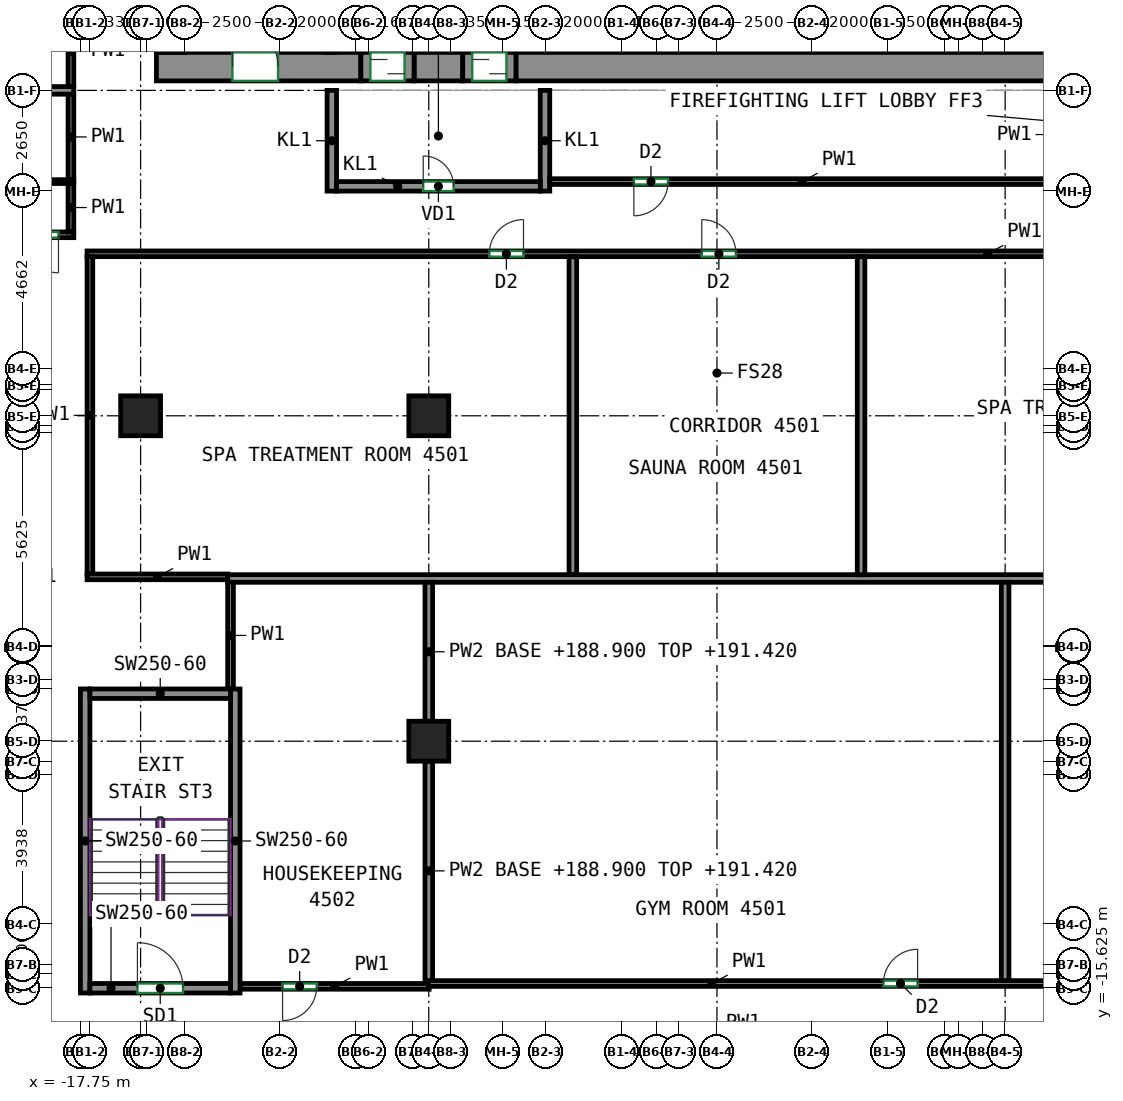
"""IFC4 building model, lengths in metres.
Left out: names, types, materials, properties, quantities, classifications, styles, units other than length and angle.
Written with IfcOpenShell. Run it as: python <this file> out.ifc"""

import sys

from ifc_helpers import new_model, si_unit, direction, frame, frame_2d, origin, origin_2d, place, context, subcontext, project, spatial, rectangle, extrude, source, transform, mapped, element, fill, save


model = new_model("IFC4")
c1 = context("Model", 3, precision=1e-05, world=origin(), true_north=direction((0.0, 1.0)))
c2 = subcontext(c1, "Body", "Model", "MODEL_VIEW")
j1 = project(units=[si_unit("LENGTHUNIT", "METRE"), si_unit("PLANEANGLEUNIT", "RADIAN")], contexts=[c1])
p1 = place(None, origin())
s1 = spatial("IfcSite", under=j1, at=p1, CompositionType="ELEMENT")
p2 = place(p1, origin())
s2 = spatial("IfcBuilding", under=s1, at=p2, CompositionType="ELEMENT")
p3 = place(p2, frame((0.0, 0.0, 188.9)))
s3 = spatial("IfcBuildingStorey", under=s2, at=p3, CompositionType="ELEMENT", Elevation=188.9)
m1 = source(origin(), c2, "Body", "SweptSolid", [
    extrude(rectangle(XDim=1.05, YDim=1.05, at=origin_2d()), origin(), (0.0, 0.0, 1.0), 3.12),
])
for number, where, z_axis, x_axis in (
    (1, (-16.167, -0.562, 0.0), (0.0, 0.0, 1.0), (1.0, 0.0, 0.0)),
    (2, (-8.583, -9.125, 0.0), (0.0, 0.0, 1.0), (1.0, 0.0, 0.0)),
    (3, (-8.583, -0.562, 0.0), (0.0, 0.0, 1.0), (1.0, 0.0, 0.0)),
):
    element("IfcColumn", number, at=place(p3, frame(where, z_axis=z_axis, x_axis=x_axis)), inside=s3, PredefinedType="COLUMN", context=c2, shape_type="MappedRepresentation", body=[
        mapped(m1, transform((0.0, 0.0, 0.0))),
    ])
m2 = source(origin(), c2, "Body", "SweptSolid", [
    extrude(rectangle(XDim=5.38, YDim=0.75, at=frame_2d((2.69, 0.0))), origin(), (0.0, 0.0, 1.0), 3.12),
])
p4 = place(p3, frame((-15.75, 8.625, 0.0), z_axis=(0.0, 0.0, 1.0), x_axis=(1.0, 0.0, 0.0)))
e4 = element("IfcWall", 4, at=p4, inside=s3, PredefinedType="SHEAR", context=c2, shape_type="MappedRepresentation", body=[
    mapped(m2, transform((0.0, 0.0, 0.0))),
])
p5 = place(p4, frame((2.0, 0.0, 0.0)))
e5 = element("IfcOpeningElement", 5, at=p5, cuts=e4, PredefinedType="OPENING", context=c2, shape_type="SweptSolid", body=[
    extrude(rectangle(XDim=1.2, YDim=2.1, at=frame_2d((0.6, 1.05))), frame((0.0, 0.385, 0.0), z_axis=(0.0, -1.0, 0.0), x_axis=(1.0, 0.0, 0.0)), (0.0, 0.0, 1.0), 0.77),
])
m3 = source(origin(), c2, "Body", "SweptSolid", [
    extrude(rectangle(XDim=1.28, YDim=0.75, at=frame_2d((0.64, 0.0))), origin(), (0.0, 0.0, 1.0), 3.12),
])
p6 = place(p3, frame((-8.97, 8.625, 0.0), z_axis=(0.0, 0.0, 1.0), x_axis=(1.0, 0.0, 0.0)))
e6 = element("IfcWall", 6, at=p6, inside=s3, PredefinedType="SHEAR", context=c2, shape_type="MappedRepresentation", body=[
    mapped(m3, transform((0.0, 0.0, 0.0))),
])
m4 = source(origin(), c2, "Body", "SweptSolid", [
    extrude(rectangle(XDim=14.18, YDim=0.75, at=frame_2d((7.09, 0.0))), origin(), (0.0, 0.0, 1.0), 3.12),
])
p7 = place(p3, frame((-6.29, 8.625, 0.0), z_axis=(0.0, 0.0, 1.0), x_axis=(1.0, 0.0, 0.0)))
e7 = element("IfcWall", 7, at=p7, inside=s3, PredefinedType="SHEAR", context=c2, shape_type="MappedRepresentation", body=[
    mapped(m4, transform((0.0, 0.0, 0.0))),
])
m5 = source(origin(), c2, "Body", "SweptSolid", [
    extrude(rectangle(XDim=8.0, YDim=0.25, at=frame_2d((4.0, 0.0))), origin(), (0.0, 0.0, 1.0), 3.12),
])
for number, where, z_axis, x_axis in (
    (8, (-17.625, -15.75, 0.0), (0.0, 0.0, 1.0), (0.0, 1.0, 0.0)),
    (9, (-13.675, -15.75, 0.0), (0.0, 0.0, 1.0), (0.0, 1.0, 0.0)),
):
    element("IfcWall", number, at=place(p3, frame(where, z_axis=z_axis, x_axis=x_axis)), inside=s3, PredefinedType="SHEAR", context=c2, shape_type="MappedRepresentation", body=[
        mapped(m5, transform((0.0, 0.0, 0.0))),
    ])
m6 = source(origin(), c2, "Body", "SweptSolid", [
    extrude(rectangle(XDim=3.7, YDim=0.25, at=frame_2d((1.85, 0.0))), origin(), (0.0, 0.0, 1.0), 3.12),
])
p8 = place(p3, frame((-17.5, -15.625, 0.0), z_axis=(0.0, 0.0, 1.0), x_axis=(1.0, 0.0, 0.0)))
e10 = element("IfcWall", 10, at=p8, inside=s3, PredefinedType="SHEAR", context=c2, shape_type="MappedRepresentation", body=[
    mapped(m6, transform((0.0, 0.0, 0.0))),
])
p9 = place(p8, frame((1.25, 0.0, 0.0)))
e11 = element("IfcOpeningElement", 11, at=p9, cuts=e10, PredefinedType="OPENING", context=c2, shape_type="SweptSolid", body=[
    extrude(rectangle(XDim=1.2, YDim=2.1, at=frame_2d((0.6, 1.05))), frame((0.0, 0.135, 0.0), z_axis=(0.0, -1.0, 0.0), x_axis=(1.0, 0.0, 0.0)), (0.0, 0.0, 1.0), 0.27),
])
p10 = place(p3, frame((-17.5, -7.875, 0.0), z_axis=(0.0, 0.0, 1.0), x_axis=(1.0, 0.0, 0.0)))
e12 = element("IfcWall", 12, at=p10, inside=s3, PredefinedType="SHEAR", context=c2, shape_type="MappedRepresentation", body=[
    mapped(m6, transform((0.0, 0.0, 0.0))),
])
m7 = source(origin(), c2, "Body", "SweptSolid", [
    extrude(rectangle(XDim=2.65, YDim=0.25, at=frame_2d((1.325, 0.0))), origin(), (0.0, 0.0, 1.0), 3.12),
])
for number, where, z_axis, x_axis in (
    (13, (-11.135, 5.35, 0.0), (0.0, 0.0, 1.0), (0.0, 1.0, 0.0)),
    (14, (-5.525, 5.35, 0.0), (0.0, 0.0, 1.0), (0.0, 1.0, 0.0)),
):
    element("IfcWall", number, at=place(p3, frame(where, z_axis=z_axis, x_axis=x_axis)), inside=s3, PredefinedType="PARTITIONING", context=c2, shape_type="MappedRepresentation", body=[
        mapped(m7, transform((0.0, 0.0, 0.0))),
    ])
m8 = source(origin(), c2, "Body", "SweptSolid", [
    extrude(rectangle(XDim=5.36, YDim=0.25, at=frame_2d((2.68, 0.0))), origin(), (0.0, 0.0, 1.0), 3.12),
])
p11 = place(p3, frame((-11.01, 5.475, 0.0), z_axis=(0.0, 0.0, 1.0), x_axis=(1.0, 0.0, 0.0)))
e15 = element("IfcWall", 15, at=p11, inside=s3, PredefinedType="PARTITIONING", context=c2, shape_type="MappedRepresentation", body=[
    mapped(m8, transform((0.0, 0.0, 0.0))),
])
p12 = place(p11, frame((2.28, 0.0, 0.0)))
e16 = element("IfcOpeningElement", 16, at=p12, cuts=e15, PredefinedType="OPENING", context=c2, shape_type="SweptSolid", body=[
    extrude(rectangle(XDim=0.8, YDim=2.0, at=frame_2d((0.4, 1.0))), frame((0.0, 0.135, 0.0), z_axis=(0.0, -1.0, 0.0), x_axis=(1.0, 0.0, 0.0)), (0.0, 0.0, 1.0), 0.27),
])
m9 = source(origin(), c2, "Body", "SweptSolid", [
    extrude(rectangle(XDim=1.4, YDim=0.75, at=frame_2d((0.7, 0.0))), origin(), (0.0, 0.0, 1.0), 2.7),
])
p13 = place(p3, frame((-10.37, 8.625, 0.0), z_axis=(0.0, 0.0, 1.0), x_axis=(1.0, 0.0, 0.0)))
e17 = element("IfcWall", 17, at=p13, inside=s3, PredefinedType="PARTITIONING", context=c2, shape_type="MappedRepresentation", body=[
    mapped(m9, transform((0.0, 0.0, 0.0))),
])
p14 = place(p13, frame((0.25, 0.0, 0.0)))
e18 = element("IfcOpeningElement", 18, at=p14, cuts=e17, PredefinedType="OPENING", context=c2, shape_type="SweptSolid", body=[
    extrude(rectangle(XDim=0.9, YDim=2.1, at=frame_2d((0.45, 1.05))), frame((0.0, 0.385, 0.0), z_axis=(0.0, -1.0, 0.0), x_axis=(1.0, 0.0, 0.0)), (0.0, 0.0, 1.0), 0.77),
])
m10 = source(origin(), c2, "Body", "SweptSolid", [
    extrude(rectangle(XDim=1.4, YDim=0.75, at=frame_2d((0.7, 0.0))), origin(), (0.0, 0.0, 1.0), 2.7),
])
p15 = place(p3, frame((-7.69, 8.625, 0.0), z_axis=(0.0, 0.0, 1.0), x_axis=(1.0, 0.0, 0.0)))
e19 = element("IfcWall", 19, at=p15, inside=s3, PredefinedType="PARTITIONING", context=c2, shape_type="MappedRepresentation", body=[
    mapped(m10, transform((0.0, 0.0, 0.0))),
])
p16 = place(p15, frame((0.25, 0.0, 0.0)))
e20 = element("IfcOpeningElement", 20, at=p16, cuts=e19, PredefinedType="OPENING", context=c2, shape_type="SweptSolid", body=[
    extrude(rectangle(XDim=0.9, YDim=2.1, at=frame_2d((0.45, 1.05))), frame((0.0, 0.385, 0.0), z_axis=(0.0, -1.0, 0.0), x_axis=(1.0, 0.0, 0.0)), (0.0, 0.0, 1.0), 0.77),
])
p17 = place(p3, frame((-17.925, 4.2, 0.0), z_axis=(0.0, 0.0, 1.0), x_axis=(-1.0, 0.0, 0.0)))
e21 = element("IfcWall", 21, at=p17, inside=s3, PredefinedType="PARTITIONING", context=c2, shape_type="SweptSolid", body=[
    extrude(rectangle(XDim=2.109, YDim=0.15, at=frame_2d((1.054, 0.0))), origin(), (0.0, 0.0, 1.0), 3.12),
])
p18 = place(p17, frame((0.403, 0.0, 0.0)))
e22 = element("IfcOpeningElement", 22, at=p18, cuts=e21, PredefinedType="OPENING", context=c2, shape_type="SweptSolid", body=[
    extrude(rectangle(XDim=1.0, YDim=2.1, at=frame_2d((0.5, 1.05))), frame((0.0, 0.085, 0.0), z_axis=(0.0, -1.0, 0.0), x_axis=(1.0, 0.0, 0.0)), (0.0, 0.0, 1.0), 0.17),
])
p19 = place(p3, frame((-18.0, 4.275, 0.0), z_axis=(0.0, 0.0, 1.0), x_axis=(0.0, 1.0, 0.0)))
e23 = element("IfcWall", 23, at=p19, inside=s3, PredefinedType="PARTITIONING", context=c2, shape_type="SweptSolid", body=[
    extrude(rectangle(XDim=1.285, YDim=0.15, at=frame_2d((0.643, 0.0))), origin(), (0.0, 0.0, 1.0), 3.12),
])
p20 = place(p3, frame((-18.0, 5.64, 0.0), z_axis=(0.0, 0.0, 1.0), x_axis=(0.0, 1.0, 0.0)))
e24 = element("IfcWall", 24, at=p20, inside=s3, PredefinedType="PARTITIONING", context=c2, shape_type="SweptSolid", body=[
    extrude(rectangle(XDim=2.27, YDim=0.15, at=frame_2d((1.135, 0.0))), origin(), (0.0, 0.0, 1.0), 3.12),
])
p21 = place(p3, frame((-18.0, 8.09, 0.0), z_axis=(0.0, 0.0, 1.0), x_axis=(0.0, 1.0, 0.0)))
e25 = element("IfcWall", 25, at=p21, inside=s3, PredefinedType="PARTITIONING", context=c2, shape_type="SweptSolid", body=[
    extrude(rectangle(XDim=1.87, YDim=0.15, at=frame_2d((0.935, 0.0))), origin(), (0.0, 0.0, 1.0), 3.12),
])
p22 = place(p3, frame((7.875, 5.6, 0.0), z_axis=(0.0, 0.0, 1.0), x_axis=(-1.0, 0.0, 0.0)))
e26 = element("IfcWall", 26, at=p22, inside=s3, PredefinedType="PARTITIONING", context=c2, shape_type="SweptSolid", body=[
    extrude(rectangle(XDim=13.275, YDim=0.15, at=frame_2d((6.637, 0.0))), origin(), (0.0, 0.0, 1.0), 3.12),
])
p23 = place(p22, frame((10.162, 0.0, 0.0)))
e27 = element("IfcOpeningElement", 27, at=p23, cuts=e26, PredefinedType="OPENING", context=c2, shape_type="SweptSolid", body=[
    extrude(rectangle(XDim=0.9, YDim=2.1, at=frame_2d((0.45, 1.05))), frame((0.0, 0.085, 0.0), z_axis=(0.0, -1.0, 0.0), x_axis=(1.0, 0.0, 0.0)), (0.0, 0.0, 1.0), 0.17),
])
p24 = place(p3, frame((-17.575, 3.7, 0.0), z_axis=(0.0, 0.0, 1.0), x_axis=(1.0, 0.0, 0.0)))
e28 = element("IfcWall", 28, at=p24, inside=s3, PredefinedType="PARTITIONING", context=c2, shape_type="SweptSolid", body=[
    extrude(rectangle(XDim=33.85, YDim=0.15, at=frame_2d((16.925, 0.0))), origin(), (0.0, 0.0, 1.0), 3.12),
])
p25 = place(p24, frame((10.584, 0.0, 0.0)))
e29 = element("IfcOpeningElement", 29, at=p25, cuts=e28, PredefinedType="OPENING", context=c2, shape_type="SweptSolid", body=[
    extrude(rectangle(XDim=0.9, YDim=2.1, at=frame_2d((0.45, 1.05))), frame((0.0, 0.085, 0.0), z_axis=(0.0, -1.0, 0.0), x_axis=(1.0, 0.0, 0.0)), (0.0, 0.0, 1.0), 0.17),
])
p26 = place(p24, frame((16.175, 0.0, 0.0)))
e30 = element("IfcOpeningElement", 30, at=p26, cuts=e28, PredefinedType="OPENING", context=c2, shape_type="SweptSolid", body=[
    extrude(rectangle(XDim=0.9, YDim=2.1, at=frame_2d((0.45, 1.05))), frame((0.0, 0.085, 0.0), z_axis=(0.0, -1.0, 0.0), x_axis=(1.0, 0.0, 0.0)), (0.0, 0.0, 1.0), 0.17),
])
p27 = place(p24, frame((25.696, 0.0, 0.0)))
e31 = element("IfcOpeningElement", 31, at=p27, cuts=e28, PredefinedType="OPENING", context=c2, shape_type="SweptSolid", body=[
    extrude(rectangle(XDim=0.9, YDim=2.1, at=frame_2d((0.45, 1.05))), frame((0.0, 0.085, 0.0), z_axis=(0.0, -1.0, 0.0), x_axis=(1.0, 0.0, 0.0)), (0.0, 0.0, 1.0), 0.17),
])
p28 = place(p3, frame((-17.5, -4.725, 0.0), z_axis=(0.0, 0.0, 1.0), x_axis=(0.0, 1.0, 0.0)))
e32 = element("IfcWall", 32, at=p28, inside=s3, PredefinedType="PARTITIONING", context=c2, shape_type="SweptSolid", body=[
    extrude(rectangle(XDim=8.35, YDim=0.15, at=frame_2d((4.175, 0.0))), origin(), (0.0, 0.0, 1.0), 3.12),
])
p29 = place(p3, frame((-17.575, -4.8, 0.0), z_axis=(0.0, 0.0, 1.0), x_axis=(1.0, 0.0, 0.0)))
e33 = element("IfcWall", 33, at=p29, inside=s3, PredefinedType="PARTITIONING", context=c2, shape_type="SweptSolid", body=[
    extrude(rectangle(XDim=3.702, YDim=0.15, at=frame_2d((1.851, 0.0))), origin(), (0.0, 0.0, 1.0), 3.12),
])
p30 = place(p3, frame((-13.8, -7.75, 0.0), z_axis=(0.0, 0.0, 1.0), x_axis=(0.0, 1.0, 0.0)))
e34 = element("IfcWall", 34, at=p30, inside=s3, PredefinedType="PARTITIONING", context=c2, shape_type="SweptSolid", body=[
    extrude(rectangle(XDim=2.817, YDim=0.15, at=frame_2d((1.408, 0.0))), origin(), (0.0, 0.0, 1.0), 3.12),
])
p31 = place(p3, frame((-8.573, -15.575, 0.0), z_axis=(0.0, 0.0, 1.0), x_axis=(-1.0, 0.0, 0.0)))
e35 = element("IfcWall", 35, at=p31, inside=s3, PredefinedType="PARTITIONING", context=c2, shape_type="SweptSolid", body=[
    extrude(rectangle(XDim=4.977, YDim=0.15, at=frame_2d((2.489, 0.0))), origin(), (0.0, 0.0, 1.0), 3.12),
])
p32 = place(p31, frame((2.958, 0.0, 0.0)))
e36 = element("IfcOpeningElement", 36, at=p32, cuts=e35, PredefinedType="OPENING", context=c2, shape_type="SweptSolid", body=[
    extrude(rectangle(XDim=0.9, YDim=2.1, at=frame_2d((0.45, 1.05))), frame((0.0, 0.085, 0.0), z_axis=(0.0, -1.0, 0.0), x_axis=(1.0, 0.0, 0.0)), (0.0, 0.0, 1.0), 0.17),
])
p33 = place(p3, frame((-8.593, -15.5, 0.0), z_axis=(0.0, 0.0, 1.0), x_axis=(1.0, 0.0, 0.0)))
e37 = element("IfcWall", 37, at=p33, inside=s3, PredefinedType="PARTITIONING", context=c2, shape_type="SweptSolid", body=[
    extrude(rectangle(XDim=24.868, YDim=0.15, at=frame_2d((12.434, 0.0))), origin(), (0.0, 0.0, 1.0), 3.12),
])
p34 = place(p33, frame((11.973, 0.0, 0.0)))
e38 = element("IfcOpeningElement", 38, at=p34, cuts=e37, PredefinedType="OPENING", context=c2, shape_type="SweptSolid", body=[
    extrude(rectangle(XDim=0.9, YDim=2.1, at=frame_2d((0.45, 1.05))), frame((0.0, 0.085, 0.0), z_axis=(0.0, -1.0, 0.0), x_axis=(1.0, 0.0, 0.0)), (0.0, 0.0, 1.0), 0.17),
])
p35 = place(p3, frame((-17.927, 5.6, 0.0), z_axis=(0.0, 0.0, 1.0), x_axis=(-1.0, 0.0, 0.0)))
e39 = element("IfcWall", 39, at=p35, inside=s3, PredefinedType="PARTITIONING", context=c2, shape_type="SweptSolid", body=[
    extrude(rectangle(XDim=3.325, YDim=0.1, at=frame_2d((1.663, 0.0))), origin(), (0.0, 0.0, 1.0), 3.12),
])
p36 = place(p35, frame((2.225, 0.0, 0.0)))
e40 = element("IfcOpeningElement", 40, at=p36, cuts=e39, PredefinedType="OPENING", context=c2, shape_type="SweptSolid", body=[
    extrude(rectangle(XDim=0.9, YDim=2.1, at=frame_2d((0.45, 1.05))), frame((0.0, 0.06, 0.0), z_axis=(0.0, -1.0, 0.0), x_axis=(1.0, 0.0, 0.0)), (0.0, 0.0, 1.0), 0.12),
])
p37 = place(p3, frame((-26.4, 8.0, 0.0), z_axis=(0.0, 0.0, 1.0), x_axis=(1.0, 0.0, 0.0)))
e41 = element("IfcWall", 41, at=p37, inside=s3, PredefinedType="PARTITIONING", context=c2, shape_type="SweptSolid", body=[
    extrude(rectangle(XDim=8.473, YDim=0.2, at=frame_2d((4.236, 0.0))), origin(), (0.0, 0.0, 1.0), 3.12),
])
p38 = place(p3, frame((-4.792, -4.743, 0.0), z_axis=(0.0, 0.0, 1.0), x_axis=(0.0, 1.0, 0.0)))
e42 = element("IfcWall", 42, at=p38, inside=s3, PredefinedType="PARTITIONING", context=c2, shape_type="SweptSolid", body=[
    extrude(rectangle(XDim=8.366, YDim=0.2, at=frame_2d((4.183, 0.0))), origin(), (0.0, 0.0, 1.0), 3.12),
])
p39 = place(p3, frame((-13.873, -4.843, 0.0), z_axis=(0.0, 0.0, 1.0), x_axis=(1.0, 0.0, 0.0)))
e43 = element("IfcWall", 43, at=p39, inside=s3, PredefinedType="PARTITIONING", context=c2, shape_type="SweptSolid", body=[
    extrude(rectangle(XDim=30.146, YDim=0.2, at=frame_2d((15.073, 0.0))), origin(), (0.0, 0.0, 1.0), 3.12),
])
p40 = place(p3, frame((2.792, -4.743, 0.0), z_axis=(0.0, 0.0, 1.0), x_axis=(0.0, 1.0, 0.0)))
e44 = element("IfcWall", 44, at=p40, inside=s3, PredefinedType="PARTITIONING", context=c2, shape_type="SweptSolid", body=[
    extrude(rectangle(XDim=8.366, YDim=0.2, at=frame_2d((4.183, 0.0))), origin(), (0.0, 0.0, 1.0), 3.12),
])
p41 = place(p3, frame((-8.583, -8.6, 0.0), z_axis=(0.0, 0.0, 1.0), x_axis=(0.0, 1.0, 0.0)))
e45 = element("IfcWall", 45, at=p41, inside=s3, PredefinedType="PARTITIONING", context=c2, shape_type="SweptSolid", body=[
    extrude(rectangle(XDim=3.657, YDim=0.2, at=frame_2d((1.829, 0.0))), origin(), (0.0, 0.0, 1.0), 2.52),
])
p42 = place(p3, frame((-8.583, -15.423, 0.0), z_axis=(0.0, 0.0, 1.0), x_axis=(0.0, 1.0, 0.0)))
e46 = element("IfcWall", 46, at=p42, inside=s3, PredefinedType="PARTITIONING", context=c2, shape_type="SweptSolid", body=[
    extrude(rectangle(XDim=5.773, YDim=0.2, at=frame_2d((2.887, 0.0))), origin(), (0.0, 0.0, 1.0), 2.52),
])
p43 = place(p3, frame((6.583, -15.423, 0.0), z_axis=(0.0, 0.0, 1.0), x_axis=(0.0, 1.0, 0.0)))
e47 = element("IfcWall", 47, at=p43, inside=s3, PredefinedType="PARTITIONING", context=c2, shape_type="SweptSolid", body=[
    extrude(rectangle(XDim=10.48, YDim=0.2, at=frame_2d((5.24, 0.0))), origin(), (0.0, 0.0, 1.0), 3.12),
])
p44 = place(p12, origin())
e48 = element("IfcDoor", 48, at=p44, inside=s3, OperationType="SINGLE_SWING_LEFT", PredefinedType="DOOR", context=c2, shape_type="SweptSolid", body=[
    extrude(rectangle(XDim=0.8, YDim=2.0, at=frame_2d((0.4, 1.0))), frame((0.0, 0.025, 0.0), z_axis=(0.0, -1.0, 0.0), x_axis=(1.0, 0.0, 0.0)), (0.0, 0.0, 1.0), 0.05),
])
fill(e16, e48)
p45 = place(p14, origin())
e49 = element("IfcDoor", 49, at=p45, inside=s3, OperationType="SLIDING_TO_LEFT", PredefinedType="DOOR", context=c2, shape_type="SweptSolid", body=[
    extrude(rectangle(XDim=0.9, YDim=2.1, at=frame_2d((0.45, 1.05))), frame((0.0, 0.28, 0.0), z_axis=(0.0, -1.0, 0.0), x_axis=(1.0, 0.0, 0.0)), (0.0, 0.0, 1.0), 0.05),
])
fill(e18, e49)
p46 = place(p16, origin())
e50 = element("IfcDoor", 50, at=p46, inside=s3, OperationType="SLIDING_TO_RIGHT", PredefinedType="DOOR", context=c2, shape_type="SweptSolid", body=[
    extrude(rectangle(XDim=0.9, YDim=2.1, at=frame_2d((0.45, 1.05))), frame((0.0, 0.28, 0.0), z_axis=(0.0, -1.0, 0.0), x_axis=(1.0, 0.0, 0.0)), (0.0, 0.0, 1.0), 0.05),
])
fill(e20, e50)
p47 = place(p5, origin())
e51 = element("IfcDoor", 51, at=p47, inside=s3, OperationType="DOUBLE_DOOR_SINGLE_SWING", PredefinedType="DOOR", context=c2, shape_type="SweptSolid", body=[
    extrude(rectangle(XDim=1.2, YDim=2.1, at=frame_2d((0.6, 1.05))), frame((0.0, 0.28, 0.0), z_axis=(0.0, -1.0, 0.0), x_axis=(1.0, 0.0, 0.0)), (0.0, 0.0, 1.0), 0.05),
])
fill(e5, e51)
p48 = place(p9, origin())
e52 = element("IfcDoor", 52, at=p48, inside=s3, OperationType="DOUBLE_DOOR_SINGLE_SWING", PredefinedType="DOOR", context=c2, shape_type="SweptSolid", body=[
    extrude(rectangle(XDim=1.2, YDim=2.1, at=frame_2d((0.6, 1.05))), frame((0.0, 0.025, 0.0), z_axis=(0.0, -1.0, 0.0), x_axis=(1.0, 0.0, 0.0)), (0.0, 0.0, 1.0), 0.05),
])
fill(e11, e52)
p49 = place(p32, origin())
e53 = element("IfcDoor", 53, at=p49, inside=s3, OperationType="SINGLE_SWING_RIGHT", PredefinedType="DOOR", context=c2, shape_type="SweptSolid", body=[
    extrude(rectangle(XDim=0.9, YDim=2.1, at=frame_2d((0.45, 1.05))), frame((0.0, 0.025, 0.0), z_axis=(0.0, -1.0, 0.0), x_axis=(1.0, 0.0, 0.0)), (0.0, 0.0, 1.0), 0.05),
])
fill(e36, e53)
p50 = place(p34, origin())
e54 = element("IfcDoor", 54, at=p50, inside=s3, OperationType="SINGLE_SWING_RIGHT", PredefinedType="DOOR", context=c2, shape_type="SweptSolid", body=[
    extrude(rectangle(XDim=0.9, YDim=2.1, at=frame_2d((0.45, 1.05))), frame((0.0, 0.025, 0.0), z_axis=(0.0, -1.0, 0.0), x_axis=(1.0, 0.0, 0.0)), (0.0, 0.0, 1.0), 0.05),
])
fill(e38, e54)
p51 = place(p25, origin())
e55 = element("IfcDoor", 55, at=p51, inside=s3, OperationType="SINGLE_SWING_RIGHT", PredefinedType="DOOR", context=c2, shape_type="SweptSolid", body=[
    extrude(rectangle(XDim=0.9, YDim=2.1, at=frame_2d((0.45, 1.05))), frame((0.0, 0.025, 0.0), z_axis=(0.0, -1.0, 0.0), x_axis=(1.0, 0.0, 0.0)), (0.0, 0.0, 1.0), 0.05),
])
fill(e29, e55)
p52 = place(p26, origin())
e56 = element("IfcDoor", 56, at=p52, inside=s3, OperationType="SINGLE_SWING_LEFT", PredefinedType="DOOR", context=c2, shape_type="SweptSolid", body=[
    extrude(rectangle(XDim=0.9, YDim=2.1, at=frame_2d((0.45, 1.05))), frame((0.0, 0.025, 0.0), z_axis=(0.0, -1.0, 0.0), x_axis=(1.0, 0.0, 0.0)), (0.0, 0.0, 1.0), 0.05),
])
fill(e30, e56)
p53 = place(p18, origin())
e57 = element("IfcDoor", 57, at=p53, inside=s3, OperationType="SINGLE_SWING_LEFT", PredefinedType="DOOR", context=c2, shape_type="SweptSolid", body=[
    extrude(rectangle(XDim=1.0, YDim=2.1, at=frame_2d((0.5, 1.05))), frame((0.0, 0.025, 0.0), z_axis=(0.0, -1.0, 0.0), x_axis=(1.0, 0.0, 0.0)), (0.0, 0.0, 1.0), 0.05),
])
fill(e22, e57)
p54 = place(p23, origin())
e58 = element("IfcDoor", 58, at=p54, inside=s3, OperationType="SINGLE_SWING_RIGHT", PredefinedType="DOOR", context=c2, shape_type="SweptSolid", body=[
    extrude(rectangle(XDim=0.9, YDim=2.1, at=frame_2d((0.45, 1.05))), frame((0.0, 0.025, 0.0), z_axis=(0.0, -1.0, 0.0), x_axis=(1.0, 0.0, 0.0)), (0.0, 0.0, 1.0), 0.05),
])
fill(e27, e58)
save(model, sys.argv[1])
